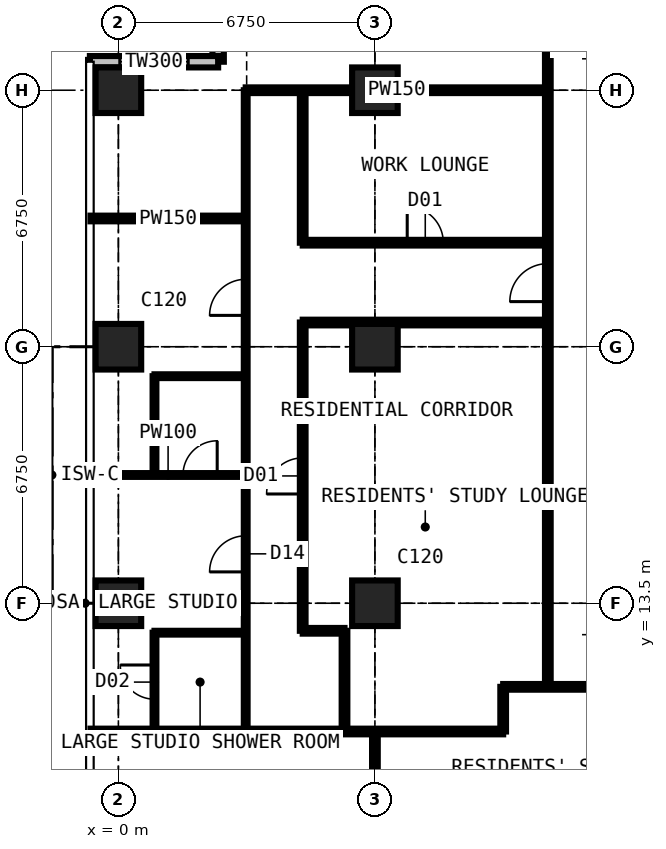
"""IFC4 building model, lengths in metres.
Left out: names, types, materials, properties, quantities, classifications, styles, units other than length and angle.
Written with IfcOpenShell. Run it as: python <this file> out.ifc"""

import sys

from ifc_helpers import new_model, si_unit, direction, frame, frame_2d, origin, origin_2d, place, context, subcontext, project, spatial, rectangle, extrude, element, fill, save


model = new_model("IFC4")
c1 = context("Model", 3, precision=1e-05, world=origin(), true_north=direction((0.0, 1.0)))
c2 = subcontext(c1, "Body", "Model", "MODEL_VIEW")
j1 = project(units=[si_unit("LENGTHUNIT", "METRE"), si_unit("PLANEANGLEUNIT", "RADIAN")], contexts=[c1])
p1 = place(None, origin())
s1 = spatial("IfcSite", under=j1, at=p1, CompositionType="ELEMENT")
p2 = place(p1, origin())
s2 = spatial("IfcBuilding", under=s1, at=p2, CompositionType="ELEMENT")
p3 = place(p2, frame((0.0, 0.0, 189.0)))
s3 = spatial("IfcBuildingStorey", under=s2, at=p3, CompositionType="ELEMENT", Elevation=189.0)
for number, where, z_axis, x_axis in (
    (1, (0.0, 13.5, 0.0), (0.0, 0.0, 1.0), (1.0, 0.0, 0.0)),
    (2, (0.0, 20.25, 0.0), (0.0, 0.0, 1.0), (1.0, 0.0, 0.0)),
    (3, (0.0, 27.0, 0.0), (0.0, 0.0, 1.0), (1.0, 0.0, 0.0)),
    (4, (6.75, 13.5, 0.0), (0.0, 0.0, 1.0), (1.0, 0.0, 0.0)),
    (5, (6.75, 20.25, 0.0), (0.0, 0.0, 1.0), (1.0, 0.0, 0.0)),
    (6, (6.75, 27.0, 0.0), (0.0, 0.0, 1.0), (1.0, 0.0, 0.0)),
):
    element("IfcColumn", number, at=place(p3, frame(where, z_axis=z_axis, x_axis=x_axis)), inside=s3, PredefinedType="COLUMN", context=c2, shape_type="SweptSolid", body=[
        extrude(rectangle(XDim=1.2, YDim=1.2, at=origin_2d()), origin(), (0.0, 0.0, 1.0), 3.6),
    ])
p4 = place(p3, frame((2.625, 31.125, 0.0), z_axis=(0.0, 0.0, 1.0), x_axis=(0.0, -1.0, 0.0)))
e7 = element("IfcWall", 7, at=p4, inside=s3, PredefinedType="SOLIDWALL", context=c2, shape_type="SweptSolid", body=[
    extrude(rectangle(XDim=3.375, YDim=0.3, at=frame_2d((1.688, 0.0))), origin(), (0.0, 0.0, 1.0), 3.375),
])
p5 = place(p4, frame((0.788, 0.0, 0.6)))
e8 = element("IfcOpeningElement", 8, at=p5, cuts=e7, PredefinedType="OPENING", context=c2, shape_type="SweptSolid", body=[
    extrude(rectangle(XDim=1.8, YDim=2.1, at=frame_2d((0.9, 1.05))), frame((0.0, 0.16, 0.0), z_axis=(0.0, -1.0, 0.0), x_axis=(1.0, 0.0, 0.0)), (0.0, 0.0, 1.0), 0.32),
])
p6 = place(p3, frame((2.625, 27.75, 0.0), z_axis=(0.0, 0.0, 1.0), x_axis=(-1.0, 0.0, 0.0)))
e9 = element("IfcWall", 9, at=p6, inside=s3, PredefinedType="SOLIDWALL", context=c2, shape_type="SweptSolid", body=[
    extrude(rectangle(XDim=3.375, YDim=0.3, at=frame_2d((1.688, 0.0))), origin(), (0.0, 0.0, 1.0), 3.375),
])
p7 = place(p6, frame((0.788, 0.0, 0.6)))
e10 = element("IfcOpeningElement", 10, at=p7, cuts=e9, PredefinedType="OPENING", context=c2, shape_type="SweptSolid", body=[
    extrude(rectangle(XDim=1.8, YDim=2.1, at=frame_2d((0.9, 1.05))), frame((0.0, 0.16, 0.0), z_axis=(0.0, -1.0, 0.0), x_axis=(1.0, 0.0, 0.0)), (0.0, 0.0, 1.0), 0.32),
])
p8 = place(p3, frame((-0.734, 10.125, 0.0), z_axis=(0.0, 0.0, 1.0), x_axis=(1.0, 0.0, 0.0)))
e11 = element("IfcWall", 11, at=p8, inside=s3, PredefinedType="PARTITIONING", context=c2, shape_type="SweptSolid", body=[
    extrude(rectangle(XDim=10.859, YDim=0.15, at=frame_2d((5.429, 0.0))), origin(), (0.0, 0.0, 1.0), 3.375),
])
p9 = place(p3, frame((-0.734, 16.875, 0.0), z_axis=(0.0, 0.0, 1.0), x_axis=(1.0, 0.0, 0.0)))
e12 = element("IfcWall", 12, at=p9, inside=s3, PredefinedType="PARTITIONING", context=c2, shape_type="SweptSolid", body=[
    extrude(rectangle(XDim=4.084, YDim=0.1, at=frame_2d((2.042, 0.0))), origin(), (0.0, 0.0, 1.0), 3.375),
])
p10 = place(p9, frame((2.434, 0.0, 0.0)))
e13 = element("IfcOpeningElement", 13, at=p10, cuts=e12, PredefinedType="OPENING", context=c2, shape_type="SweptSolid", body=[
    extrude(rectangle(XDim=0.9, YDim=2.2, at=frame_2d((0.45, 1.1))), frame((0.0, 0.06, 0.0), z_axis=(0.0, -1.0, 0.0), x_axis=(1.0, 0.0, 0.0)), (0.0, 0.0, 1.0), 0.12),
])
p11 = place(p3, frame((-0.734, 23.625, 0.0), z_axis=(0.0, 0.0, 1.0), x_axis=(1.0, 0.0, 0.0)))
e14 = element("IfcWall", 14, at=p11, inside=s3, PredefinedType="PARTITIONING", context=c2, shape_type="SweptSolid", body=[
    extrude(rectangle(XDim=4.084, YDim=0.15, at=frame_2d((2.042, 0.0))), origin(), (0.0, 0.0, 1.0), 3.375),
])
p12 = place(p3, frame((0.95, 10.125, 0.0), z_axis=(0.0, 0.0, 1.0), x_axis=(0.0, 1.0, 0.0)))
e15 = element("IfcWall", 15, at=p12, inside=s3, PredefinedType="PARTITIONING", context=c2, shape_type="SweptSolid", body=[
    extrude(rectangle(XDim=2.6, YDim=0.1, at=frame_2d((1.3, 0.0))), origin(), (0.0, 0.0, 1.0), 3.375),
])
p13 = place(p12, frame((0.85, 0.0, 0.0)))
e16 = element("IfcOpeningElement", 16, at=p13, cuts=e15, PredefinedType="OPENING", context=c2, shape_type="SweptSolid", body=[
    extrude(rectangle(XDim=0.9, YDim=2.2, at=frame_2d((0.45, 1.1))), frame((0.0, 0.06, 0.0), z_axis=(0.0, -1.0, 0.0), x_axis=(1.0, 0.0, 0.0)), (0.0, 0.0, 1.0), 0.12),
])
p14 = place(p3, frame((0.95, 12.725, 0.0), z_axis=(0.0, 0.0, 1.0), x_axis=(1.0, 0.0, 0.0)))
e17 = element("IfcWall", 17, at=p14, inside=s3, PredefinedType="PARTITIONING", context=c2, shape_type="SweptSolid", body=[
    extrude(rectangle(XDim=2.4, YDim=0.1, at=frame_2d((1.2, 0.0))), origin(), (0.0, 0.0, 1.0), 3.375),
])
p15 = place(p3, frame((0.95, 16.875, 0.0), z_axis=(0.0, 0.0, 1.0), x_axis=(0.0, 1.0, 0.0)))
e18 = element("IfcWall", 18, at=p15, inside=s3, PredefinedType="PARTITIONING", context=c2, shape_type="SweptSolid", body=[
    extrude(rectangle(XDim=2.6, YDim=0.1, at=frame_2d((1.3, 0.0))), origin(), (0.0, 0.0, 1.0), 3.375),
])
p16 = place(p3, frame((0.95, 19.475, 0.0), z_axis=(0.0, 0.0, 1.0), x_axis=(1.0, 0.0, 0.0)))
e19 = element("IfcWall", 19, at=p16, inside=s3, PredefinedType="PARTITIONING", context=c2, shape_type="SweptSolid", body=[
    extrude(rectangle(XDim=2.4, YDim=0.1, at=frame_2d((1.2, 0.0))), origin(), (0.0, 0.0, 1.0), 3.375),
])
p17 = place(p3, frame((3.35, 10.125, 0.0), z_axis=(0.0, 0.0, 1.0), x_axis=(0.0, 1.0, 0.0)))
e20 = element("IfcWall", 20, at=p17, inside=s3, PredefinedType="PARTITIONING", context=c2, shape_type="SweptSolid", body=[
    extrude(rectangle(XDim=16.875, YDim=0.1, at=frame_2d((8.438, 0.0))), origin(), (0.0, 0.0, 1.0), 3.375),
])
p18 = place(p17, frame((4.2, 0.0, 0.0)))
e21 = element("IfcOpeningElement", 21, at=p18, cuts=e20, PredefinedType="OPENING", context=c2, shape_type="SweptSolid", body=[
    extrude(rectangle(XDim=0.95, YDim=2.2, at=frame_2d((0.475, 1.1))), frame((0.0, 0.06, 0.0), z_axis=(0.0, -1.0, 0.0), x_axis=(1.0, 0.0, 0.0)), (0.0, 0.0, 1.0), 0.12),
])
p19 = place(p17, frame((10.95, 0.0, 0.0)))
e22 = element("IfcOpeningElement", 22, at=p19, cuts=e20, PredefinedType="OPENING", context=c2, shape_type="SweptSolid", body=[
    extrude(rectangle(XDim=0.95, YDim=2.2, at=frame_2d((0.475, 1.1))), frame((0.0, 0.06, 0.0), z_axis=(0.0, -1.0, 0.0), x_axis=(1.0, 0.0, 0.0)), (0.0, 0.0, 1.0), 0.12),
])
p20 = place(p3, frame((3.35, 27.0, 0.0), z_axis=(0.0, 0.0, 1.0), x_axis=(1.0, 0.0, 0.0)))
e23 = element("IfcWall", 23, at=p20, inside=s3, PredefinedType="PARTITIONING", context=c2, shape_type="SweptSolid", body=[
    extrude(rectangle(XDim=7.95, YDim=0.15, at=frame_2d((3.975, 0.0))), origin(), (0.0, 0.0, 1.0), 2.806),
])
p21 = place(p3, frame((4.85, 12.775, 0.0), z_axis=(0.0, 0.0, 1.0), x_axis=(0.0, 1.0, 0.0)))
e24 = element("IfcWall", 24, at=p21, inside=s3, PredefinedType="PARTITIONING", context=c2, shape_type="SweptSolid", body=[
    extrude(rectangle(XDim=8.113, YDim=0.15, at=frame_2d((4.056, 0.0))), origin(), (0.0, 0.0, 1.0), 3.375),
])
p22 = place(p21, frame((3.6, 0.0, 0.0)))
e25 = element("IfcOpeningElement", 25, at=p22, cuts=e24, PredefinedType="OPENING", context=c2, shape_type="SweptSolid", body=[
    extrude(rectangle(XDim=0.95, YDim=2.2, at=frame_2d((0.475, 1.1))), frame((0.0, 0.085, 0.0), z_axis=(0.0, -1.0, 0.0), x_axis=(1.0, 0.0, 0.0)), (0.0, 0.0, 1.0), 0.17),
])
p23 = place(p3, frame((4.85, 12.775, 0.0), z_axis=(0.0, 0.0, 1.0), x_axis=(1.0, 0.0, 0.0)))
e26 = element("IfcWall", 26, at=p23, inside=s3, PredefinedType="PARTITIONING", context=c2, shape_type="SweptSolid", body=[
    extrude(rectangle(XDim=1.1, YDim=0.15, at=frame_2d((0.55, 0.0))), origin(), (0.0, 0.0, 1.0), 3.375),
])
p24 = place(p3, frame((4.85, 20.887, 0.0), z_axis=(0.0, 0.0, 1.0), x_axis=(1.0, 0.0, 0.0)))
e27 = element("IfcWall", 27, at=p24, inside=s3, PredefinedType="PARTITIONING", context=c2, shape_type="SweptSolid", body=[
    extrude(rectangle(XDim=6.45, YDim=0.15, at=frame_2d((3.225, 0.0))), origin(), (0.0, 0.0, 1.0), 3.375),
])
p25 = place(p3, frame((4.85, 22.988, 0.0), z_axis=(0.0, 0.0, 1.0), x_axis=(0.0, 1.0, 0.0)))
e28 = element("IfcWall", 28, at=p25, inside=s3, PredefinedType="PARTITIONING", context=c2, shape_type="SweptSolid", body=[
    extrude(rectangle(XDim=4.012, YDim=0.15, at=frame_2d((2.006, 0.0))), origin(), (0.0, 0.0, 1.0), 3.375),
])
p26 = place(p3, frame((4.85, 22.988, 0.0), z_axis=(0.0, 0.0, 1.0), x_axis=(1.0, 0.0, 0.0)))
e29 = element("IfcWall", 29, at=p26, inside=s3, PredefinedType="PARTITIONING", context=c2, shape_type="SweptSolid", body=[
    extrude(rectangle(XDim=6.45, YDim=0.15, at=frame_2d((3.225, 0.0))), origin(), (0.0, 0.0, 1.0), 3.375),
])
p27 = place(p26, frame((2.75, 0.0, 0.0)))
e30 = element("IfcOpeningElement", 30, at=p27, cuts=e29, PredefinedType="OPENING", context=c2, shape_type="SweptSolid", body=[
    extrude(rectangle(XDim=0.95, YDim=2.2, at=frame_2d((0.475, 1.1))), frame((0.0, 0.085, 0.0), z_axis=(0.0, -1.0, 0.0), x_axis=(1.0, 0.0, 0.0)), (0.0, 0.0, 1.0), 0.17),
])
p28 = place(p3, frame((5.95, 10.125, 0.0), z_axis=(0.0, 0.0, 1.0), x_axis=(0.0, 1.0, 0.0)))
e31 = element("IfcWall", 31, at=p28, inside=s3, PredefinedType="PARTITIONING", context=c2, shape_type="SweptSolid", body=[
    extrude(rectangle(XDim=2.65, YDim=0.15, at=frame_2d((1.325, 0.0))), origin(), (0.0, 0.0, 1.0), 3.375),
])
p29 = place(p3, frame((6.75, 3.35, 0.0), z_axis=(0.0, 0.0, 1.0), x_axis=(0.0, 1.0, 0.0)))
e32 = element("IfcWall", 32, at=p29, inside=s3, PredefinedType="PARTITIONING", context=c2, shape_type="SweptSolid", body=[
    extrude(rectangle(XDim=6.775, YDim=0.15, at=frame_2d((3.387, 0.0))), origin(), (0.0, 0.0, 1.0), 2.877),
])
p30 = place(p3, frame((10.125, 10.125, 0.0), z_axis=(0.0, 0.0, 1.0), x_axis=(0.0, 1.0, 0.0)))
e33 = element("IfcWall", 33, at=p30, inside=s3, PredefinedType="PARTITIONING", context=c2, shape_type="SweptSolid", body=[
    extrude(rectangle(XDim=1.175, YDim=0.15, at=frame_2d((0.587, 0.0))), origin(), (0.0, 0.0, 1.0), 3.375),
])
p31 = place(p3, frame((10.125, 11.3, 0.0), z_axis=(0.0, 0.0, 1.0), x_axis=(1.0, 0.0, 0.0)))
e34 = element("IfcWall", 34, at=p31, inside=s3, PredefinedType="PARTITIONING", context=c2, shape_type="SweptSolid", body=[
    extrude(rectangle(XDim=20.475, YDim=0.15, at=frame_2d((10.238, 0.0))), origin(), (0.0, 0.0, 1.0), 3.375),
])
p32 = place(p31, frame((8.425, 0.0, 0.0)))
e35 = element("IfcOpeningElement", 35, at=p32, cuts=e34, PredefinedType="OPENING", context=c2, shape_type="SweptSolid", body=[
    extrude(rectangle(XDim=1.0, YDim=2.2, at=frame_2d((0.5, 1.1))), frame((0.0, 0.085, 0.0), z_axis=(0.0, -1.0, 0.0), x_axis=(1.0, 0.0, 0.0)), (0.0, 0.0, 1.0), 0.17),
])
p33 = place(p31, frame((10.975, 0.0, 0.0)))
e36 = element("IfcOpeningElement", 36, at=p33, cuts=e34, PredefinedType="OPENING", context=c2, shape_type="SweptSolid", body=[
    extrude(rectangle(XDim=1.0, YDim=2.2, at=frame_2d((0.5, 1.1))), frame((0.0, 0.085, 0.0), z_axis=(0.0, -1.0, 0.0), x_axis=(1.0, 0.0, 0.0)), (0.0, 0.0, 1.0), 0.17),
])
p34 = place(p31, frame((3.925, 0.0, 0.0)))
e37 = element("IfcOpeningElement", 37, at=p34, cuts=e34, PredefinedType="OPENING", context=c2, shape_type="SweptSolid", body=[
    extrude(rectangle(XDim=0.95, YDim=2.2, at=frame_2d((0.475, 1.1))), frame((0.0, 0.085, 0.0), z_axis=(0.0, -1.0, 0.0), x_axis=(1.0, 0.0, 0.0)), (0.0, 0.0, 1.0), 0.17),
])
p35 = place(p3, frame((11.3, 11.3, 0.0), z_axis=(0.0, 0.0, 1.0), x_axis=(0.0, 1.0, 0.0)))
e38 = element("IfcWall", 38, at=p35, inside=s3, PredefinedType="PARTITIONING", context=c2, shape_type="SweptSolid", body=[
    extrude(rectangle(XDim=19.3, YDim=0.15, at=frame_2d((9.65, 0.0))), origin(), (0.0, 0.0, 1.0), 3.375),
])
p36 = place(p35, frame((18.1, 0.0, 0.0)))
e39 = element("IfcOpeningElement", 39, at=p36, cuts=e38, PredefinedType="OPENING", context=c2, shape_type="SweptSolid", body=[
    extrude(rectangle(XDim=1.0, YDim=2.2, at=frame_2d((0.5, 1.1))), frame((0.0, 0.085, 0.0), z_axis=(0.0, -1.0, 0.0), x_axis=(1.0, 0.0, 0.0)), (0.0, 0.0, 1.0), 0.17),
])
p37 = place(p35, frame((10.137, 0.0, 0.0)))
e40 = element("IfcOpeningElement", 40, at=p37, cuts=e38, PredefinedType="OPENING", context=c2, shape_type="SweptSolid", body=[
    extrude(rectangle(XDim=1.0, YDim=2.2, at=frame_2d((0.5, 1.1))), frame((0.0, 0.085, 0.0), z_axis=(0.0, -1.0, 0.0), x_axis=(1.0, 0.0, 0.0)), (0.0, 0.0, 1.0), 0.17),
])
p38 = place(p7, origin())
e41 = element("IfcWindow", 41, at=p38, inside=s3, PartitioningType="SINGLE_PANEL", PredefinedType="WINDOW", context=c2, shape_type="SweptSolid", body=[
    extrude(rectangle(XDim=1.8, YDim=2.1, at=frame_2d((0.9, 1.05))), frame((0.0, 0.03, 0.0), z_axis=(0.0, -1.0, 0.0), x_axis=(1.0, 0.0, 0.0)), (0.0, 0.0, 1.0), 0.06),
])
fill(e10, e41)
p39 = place(p18, origin())
e42 = element("IfcDoor", 42, at=p39, inside=s3, OperationType="SINGLE_SWING_LEFT", PredefinedType="DOOR", context=c2, shape_type="SweptSolid", body=[
    extrude(rectangle(XDim=0.95, YDim=2.2, at=frame_2d((0.475, 1.1))), frame((0.0, 0.025, 0.0), z_axis=(0.0, -1.0, 0.0), x_axis=(1.0, 0.0, 0.0)), (0.0, 0.0, 1.0), 0.05),
])
fill(e21, e42)
p40 = place(p13, origin())
e43 = element("IfcDoor", 43, at=p40, inside=s3, OperationType="SINGLE_SWING_RIGHT", PredefinedType="DOOR", context=c2, shape_type="SweptSolid", body=[
    extrude(rectangle(XDim=0.9, YDim=2.2, at=frame_2d((0.45, 1.1))), frame((0.0, 0.025, 0.0), z_axis=(0.0, -1.0, 0.0), x_axis=(1.0, 0.0, 0.0)), (0.0, 0.0, 1.0), 0.05),
])
fill(e16, e43)
p41 = place(p19, origin())
e44 = element("IfcDoor", 44, at=p41, inside=s3, OperationType="SINGLE_SWING_LEFT", PredefinedType="DOOR", context=c2, shape_type="SweptSolid", body=[
    extrude(rectangle(XDim=0.95, YDim=2.2, at=frame_2d((0.475, 1.1))), frame((0.0, 0.025, 0.0), z_axis=(0.0, -1.0, 0.0), x_axis=(1.0, 0.0, 0.0)), (0.0, 0.0, 1.0), 0.05),
])
fill(e22, e44)
p42 = place(p10, origin())
e45 = element("IfcDoor", 45, at=p42, inside=s3, OperationType="SINGLE_SWING_RIGHT", PredefinedType="DOOR", context=c2, shape_type="SweptSolid", body=[
    extrude(rectangle(XDim=0.9, YDim=2.2, at=frame_2d((0.45, 1.1))), frame((0.0, 0.025, 0.0), z_axis=(0.0, -1.0, 0.0), x_axis=(1.0, 0.0, 0.0)), (0.0, 0.0, 1.0), 0.05),
])
fill(e13, e45)
p43 = place(p37, origin())
e46 = element("IfcDoor", 46, at=p43, inside=s3, OperationType="SINGLE_SWING_LEFT", PredefinedType="DOOR", context=c2, shape_type="SweptSolid", body=[
    extrude(rectangle(XDim=1.0, YDim=2.2, at=frame_2d((0.5, 1.1))), frame((0.0, 0.025, 0.0), z_axis=(0.0, -1.0, 0.0), x_axis=(1.0, 0.0, 0.0)), (0.0, 0.0, 1.0), 0.05),
])
fill(e40, e46)
p44 = place(p22, origin())
e47 = element("IfcDoor", 47, at=p44, inside=s3, OperationType="SINGLE_SWING_LEFT", PredefinedType="DOOR", context=c2, shape_type="SweptSolid", body=[
    extrude(rectangle(XDim=0.95, YDim=2.2, at=frame_2d((0.475, 1.1))), frame((0.0, 0.025, 0.0), z_axis=(0.0, -1.0, 0.0), x_axis=(1.0, 0.0, 0.0)), (0.0, 0.0, 1.0), 0.05),
])
fill(e25, e47)
p45 = place(p27, origin())
e48 = element("IfcDoor", 48, at=p45, inside=s3, OperationType="SINGLE_SWING_LEFT", PredefinedType="DOOR", context=c2, shape_type="SweptSolid", body=[
    extrude(rectangle(XDim=0.95, YDim=2.2, at=frame_2d((0.475, 1.1))), frame((0.0, 0.025, 0.0), z_axis=(0.0, -1.0, 0.0), x_axis=(1.0, 0.0, 0.0)), (0.0, 0.0, 1.0), 0.05),
])
fill(e30, e48)
save(model, sys.argv[1])
